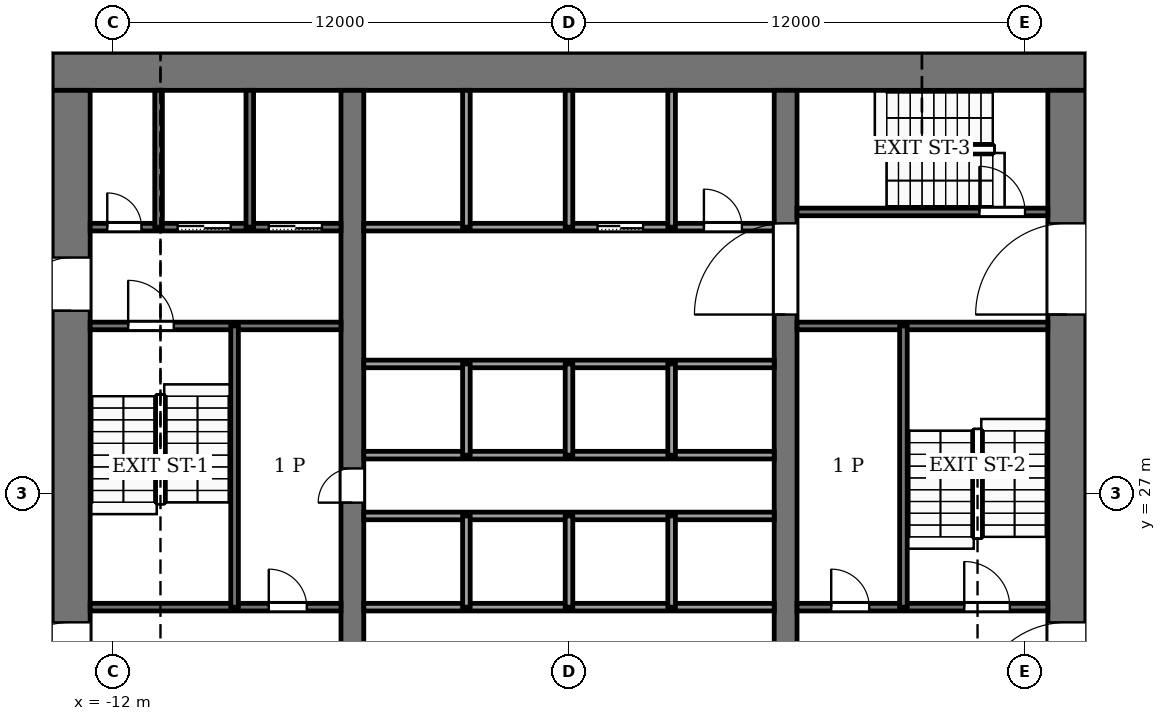
"""IFC4 building model, lengths in metres.
Left out: names, types, materials, properties, quantities, classifications, styles, units other than length and angle.
Written with IfcOpenShell. Run it as: python <this file> out.ifc"""

import sys

from ifc_helpers import new_model, si_unit, direction, frame, frame_2d, origin, place, context, subcontext, project, spatial, rectangle, extrude, element, fill, save


model = new_model("IFC4")
c1 = context("Model", 3, precision=1e-05, world=origin(), true_north=direction((0.0, 1.0)))
c2 = subcontext(c1, "Body", "Model", "MODEL_VIEW")
j1 = project(units=[si_unit("LENGTHUNIT", "METRE"), si_unit("PLANEANGLEUNIT", "RADIAN")], contexts=[c1])
p1 = place(None, origin())
s1 = spatial("IfcSite", under=j1, at=p1, CompositionType="ELEMENT")
p2 = place(p1, origin())
s2 = spatial("IfcBuilding", under=s1, at=p2, CompositionType="ELEMENT")
p3 = place(p2, frame((0.0, 0.0, 170.0)))
s3 = spatial("IfcBuildingStorey", under=s2, at=p3, CompositionType="ELEMENT", Elevation=170.0)
p4 = place(p3, frame((-13.6, 38.1, -0.25), z_axis=(0.0, 0.0, 1.0), x_axis=(1.0, 0.0, 0.0)))
e1 = element("IfcWall", 1, at=p4, inside=s3, PredefinedType="SHEAR", context=c2, shape_type="SweptSolid", body=[
    extrude(rectangle(XDim=27.2, YDim=1.0, at=frame_2d((13.6, 0.0))), origin(), (0.0, 0.0, 1.0), 7.12),
])
p5 = place(p3, frame((-13.1, 18.4, -0.25), z_axis=(0.0, 0.0, 1.0), x_axis=(0.0, 1.0, 0.0)))
e2 = element("IfcWall", 2, at=p5, inside=s3, PredefinedType="SHEAR", context=c2, shape_type="SweptSolid", body=[
    extrude(rectangle(XDim=19.2, YDim=1.0, at=frame_2d((9.6, 0.0))), origin(), (0.0, 0.0, 1.0), 7.12),
])
p6 = place(p5, frame((2.8, 0.0, 0.25)))
e3 = element("IfcOpeningElement", 3, at=p6, cuts=e2, PredefinedType="OPENING", context=c2, shape_type="SweptSolid", body=[
    extrude(rectangle(XDim=2.4, YDim=2.4, at=frame_2d((1.2, 1.2))), frame((0.0, 0.51, 0.0), z_axis=(0.0, -1.0, 0.0), x_axis=(1.0, 0.0, 0.0)), (0.0, 0.0, 1.0), 1.02),
])
p7 = place(p5, frame((13.4, 0.0, 0.25)))
e4 = element("IfcOpeningElement", 4, at=p7, cuts=e2, PredefinedType="OPENING", context=c2, shape_type="SweptSolid", body=[
    extrude(rectangle(XDim=1.4, YDim=2.2, at=frame_2d((0.7, 1.1))), frame((0.0, 0.51, 0.0), z_axis=(0.0, -1.0, 0.0), x_axis=(1.0, 0.0, 0.0)), (0.0, 0.0, 1.0), 1.02),
])
p8 = place(p3, frame((13.1, 18.4, -0.25), z_axis=(0.0, 0.0, 1.0), x_axis=(0.0, 1.0, 0.0)))
e5 = element("IfcWall", 5, at=p8, inside=s3, PredefinedType="SHEAR", context=c2, shape_type="SweptSolid", body=[
    extrude(rectangle(XDim=19.2, YDim=1.0, at=frame_2d((9.6, 0.0))), origin(), (0.0, 0.0, 1.0), 7.12),
])
p9 = place(p8, frame((2.8, 0.0, 0.25)))
e6 = element("IfcOpeningElement", 6, at=p9, cuts=e5, PredefinedType="OPENING", context=c2, shape_type="SweptSolid", body=[
    extrude(rectangle(XDim=2.4, YDim=2.4, at=frame_2d((1.2, 1.2))), frame((0.0, 0.51, 0.0), z_axis=(0.0, -1.0, 0.0), x_axis=(1.0, 0.0, 0.0)), (0.0, 0.0, 1.0), 1.02),
])
p10 = place(p8, frame((13.3, 0.0, 0.25)))
e7 = element("IfcOpeningElement", 7, at=p10, cuts=e5, PredefinedType="OPENING", context=c2, shape_type="SweptSolid", body=[
    extrude(rectangle(XDim=2.4, YDim=2.4, at=frame_2d((1.2, 1.2))), frame((0.0, 0.51, 0.0), z_axis=(0.0, -1.0, 0.0), x_axis=(1.0, 0.0, 0.0)), (0.0, 0.0, 1.0), 1.02),
])
p11 = place(p3, frame((-5.7, 18.4, -0.25), z_axis=(0.0, 0.0, 1.0), x_axis=(0.0, 1.0, 0.0)))
e8 = element("IfcWall", 8, at=p11, inside=s3, PredefinedType="SHEAR", context=c2, shape_type="SweptSolid", body=[
    extrude(rectangle(XDim=19.2, YDim=0.6, at=frame_2d((9.6, 0.0))), origin(), (0.0, 0.0, 1.0), 7.12),
])
p12 = place(p11, frame((8.35, 0.0, 0.25)))
e9 = element("IfcOpeningElement", 9, at=p12, cuts=e8, PredefinedType="OPENING", context=c2, shape_type="SweptSolid", body=[
    extrude(rectangle(XDim=0.9, YDim=2.1, at=frame_2d((0.45, 1.05))), frame((0.0, 0.31, 0.0), z_axis=(0.0, -1.0, 0.0), x_axis=(1.0, 0.0, 0.0)), (0.0, 0.0, 1.0), 0.62),
])
p13 = place(p3, frame((5.7, 18.4, -0.25), z_axis=(0.0, 0.0, 1.0), x_axis=(0.0, 1.0, 0.0)))
e10 = element("IfcWall", 10, at=p13, inside=s3, PredefinedType="SHEAR", context=c2, shape_type="SweptSolid", body=[
    extrude(rectangle(XDim=19.2, YDim=0.6, at=frame_2d((9.6, 0.0))), origin(), (0.0, 0.0, 1.0), 7.12),
])
p14 = place(p13, frame((13.3, 0.0, 0.25)))
e11 = element("IfcOpeningElement", 11, at=p14, cuts=e10, PredefinedType="OPENING", context=c2, shape_type="SweptSolid", body=[
    extrude(rectangle(XDim=2.4, YDim=2.4, at=frame_2d((1.2, 1.2))), frame((0.0, 0.31, 0.0), z_axis=(0.0, -1.0, 0.0), x_axis=(1.0, 0.0, 0.0)), (0.0, 0.0, 1.0), 0.62),
])
p15 = place(p3, frame((-12.6, 24.0, 0.0), z_axis=(0.0, 0.0, 1.0), x_axis=(1.0, 0.0, 0.0)))
e12 = element("IfcWall", 12, at=p15, inside=s3, PredefinedType="PARTITIONING", context=c2, shape_type="SweptSolid", body=[
    extrude(rectangle(XDim=6.6, YDim=0.2, at=frame_2d((3.3, 0.0))), origin(), (0.0, 0.0, 1.0), 6.87),
])
p16 = place(p15, frame((4.7, 0.0, 0.0)))
e13 = element("IfcOpeningElement", 13, at=p16, cuts=e12, PredefinedType="OPENING", context=c2, shape_type="SweptSolid", body=[
    extrude(rectangle(XDim=1.0, YDim=2.1, at=frame_2d((0.5, 1.05))), frame((0.0, 0.11, 0.0), z_axis=(0.0, -1.0, 0.0), x_axis=(1.0, 0.0, 0.0)), (0.0, 0.0, 1.0), 0.22),
])
p17 = place(p3, frame((-5.4, 24.0, 0.0), z_axis=(0.0, 0.0, 1.0), x_axis=(1.0, 0.0, 0.0)))
e14 = element("IfcWall", 14, at=p17, inside=s3, PredefinedType="PARTITIONING", context=c2, shape_type="SweptSolid", body=[
    extrude(rectangle(XDim=10.8, YDim=0.2, at=frame_2d((5.4, 0.0))), origin(), (0.0, 0.0, 1.0), 6.87),
])
p18 = place(p3, frame((6.0, 24.0, 0.0), z_axis=(0.0, 0.0, 1.0), x_axis=(1.0, 0.0, 0.0)))
e15 = element("IfcWall", 15, at=p18, inside=s3, PredefinedType="PARTITIONING", context=c2, shape_type="SweptSolid", body=[
    extrude(rectangle(XDim=6.6, YDim=0.2, at=frame_2d((3.3, 0.0))), origin(), (0.0, 0.0, 1.0), 6.87),
])
p19 = place(p18, frame((0.9, 0.0, 0.0)))
e16 = element("IfcOpeningElement", 16, at=p19, cuts=e15, PredefinedType="OPENING", context=c2, shape_type="SweptSolid", body=[
    extrude(rectangle(XDim=1.0, YDim=2.1, at=frame_2d((0.5, 1.05))), frame((0.0, 0.11, 0.0), z_axis=(0.0, -1.0, 0.0), x_axis=(1.0, 0.0, 0.0)), (0.0, 0.0, 1.0), 0.22),
])
p20 = place(p18, frame((4.4, 0.0, 0.0)))
e17 = element("IfcOpeningElement", 17, at=p20, cuts=e15, PredefinedType="OPENING", context=c2, shape_type="SweptSolid", body=[
    extrude(rectangle(XDim=1.2, YDim=2.2, at=frame_2d((0.6, 1.1))), frame((0.0, 0.11, 0.0), z_axis=(0.0, -1.0, 0.0), x_axis=(1.0, 0.0, 0.0)), (0.0, 0.0, 1.0), 0.22),
])
for number, where, z_axis, x_axis in (
    (18, (-5.4, 26.4, 0.0), (0.0, 0.0, 1.0), (1.0, 0.0, 0.0)),
    (19, (-5.4, 28.0, 0.0), (0.0, 0.0, 1.0), (1.0, 0.0, 0.0)),
    (20, (-5.4, 30.4, 0.0), (0.0, 0.0, 1.0), (1.0, 0.0, 0.0)),
):
    element("IfcWall", number, at=place(p3, frame(where, z_axis=z_axis, x_axis=x_axis)), inside=s3, PredefinedType="PARTITIONING", context=c2, shape_type="SweptSolid", body=[
        extrude(rectangle(XDim=10.8, YDim=0.2, at=frame_2d((5.4, 0.0))), origin(), (0.0, 0.0, 1.0), 6.87),
    ])
p21 = place(p3, frame((-12.6, 31.4, 0.0), z_axis=(0.0, 0.0, 1.0), x_axis=(1.0, 0.0, 0.0)))
e21 = element("IfcWall", 21, at=p21, inside=s3, PredefinedType="PARTITIONING", context=c2, shape_type="SweptSolid", body=[
    extrude(rectangle(XDim=6.6, YDim=0.2, at=frame_2d((3.3, 0.0))), origin(), (0.0, 0.0, 1.0), 6.87),
])
p22 = place(p21, frame((1.0, 0.0, 0.0)))
e22 = element("IfcOpeningElement", 22, at=p22, cuts=e21, PredefinedType="OPENING", context=c2, shape_type="SweptSolid", body=[
    extrude(rectangle(XDim=1.2, YDim=2.2, at=frame_2d((0.6, 1.1))), frame((0.0, 0.11, 0.0), z_axis=(0.0, -1.0, 0.0), x_axis=(1.0, 0.0, 0.0)), (0.0, 0.0, 1.0), 0.22),
])
p23 = place(p3, frame((6.0, 31.4, 0.0), z_axis=(0.0, 0.0, 1.0), x_axis=(1.0, 0.0, 0.0)))
e23 = element("IfcWall", 23, at=p23, inside=s3, PredefinedType="PARTITIONING", context=c2, shape_type="SweptSolid", body=[
    extrude(rectangle(XDim=6.6, YDim=0.2, at=frame_2d((3.3, 0.0))), origin(), (0.0, 0.0, 1.0), 6.87),
])
p24 = place(p3, frame((-12.6, 34.0, 0.0), z_axis=(0.0, 0.0, 1.0), x_axis=(1.0, 0.0, 0.0)))
e24 = element("IfcWall", 24, at=p24, inside=s3, PredefinedType="PARTITIONING", context=c2, shape_type="SweptSolid", body=[
    extrude(rectangle(XDim=6.6, YDim=0.2, at=frame_2d((3.3, 0.0))), origin(), (0.0, 0.0, 1.0), 6.87),
])
p25 = place(p24, frame((4.7, 0.0, 0.0)))
e25 = element("IfcOpeningElement", 25, at=p25, cuts=e24, PredefinedType="OPENING", context=c2, shape_type="SweptSolid", body=[
    extrude(rectangle(XDim=1.4, YDim=2.2, at=frame_2d((0.7, 1.1))), frame((0.0, 0.11, 0.0), z_axis=(0.0, -1.0, 0.0), x_axis=(1.0, 0.0, 0.0)), (0.0, 0.0, 1.0), 0.22),
])
p26 = place(p24, frame((2.3, 0.0, 0.0)))
e26 = element("IfcOpeningElement", 26, at=p26, cuts=e24, PredefinedType="OPENING", context=c2, shape_type="SweptSolid", body=[
    extrude(rectangle(XDim=1.4, YDim=2.2, at=frame_2d((0.7, 1.1))), frame((0.0, 0.11, 0.0), z_axis=(0.0, -1.0, 0.0), x_axis=(1.0, 0.0, 0.0)), (0.0, 0.0, 1.0), 0.22),
])
p27 = place(p24, frame((0.45, 0.0, 0.0)))
e27 = element("IfcOpeningElement", 27, at=p27, cuts=e24, PredefinedType="OPENING", context=c2, shape_type="SweptSolid", body=[
    extrude(rectangle(XDim=0.9, YDim=2.1, at=frame_2d((0.45, 1.05))), frame((0.0, 0.11, 0.0), z_axis=(0.0, -1.0, 0.0), x_axis=(1.0, 0.0, 0.0)), (0.0, 0.0, 1.0), 0.22),
])
p28 = place(p3, frame((-5.4, 34.0, 0.0), z_axis=(0.0, 0.0, 1.0), x_axis=(1.0, 0.0, 0.0)))
e28 = element("IfcWall", 28, at=p28, inside=s3, PredefinedType="PARTITIONING", context=c2, shape_type="SweptSolid", body=[
    extrude(rectangle(XDim=10.8, YDim=0.2, at=frame_2d((5.4, 0.0))), origin(), (0.0, 0.0, 1.0), 6.87),
])
p29 = place(p28, frame((6.15, 0.0, 0.0)))
e29 = element("IfcOpeningElement", 29, at=p29, cuts=e28, PredefinedType="OPENING", context=c2, shape_type="SweptSolid", body=[
    extrude(rectangle(XDim=1.2, YDim=2.2, at=frame_2d((0.6, 1.1))), frame((0.0, 0.11, 0.0), z_axis=(0.0, -1.0, 0.0), x_axis=(1.0, 0.0, 0.0)), (0.0, 0.0, 1.0), 0.22),
])
p30 = place(p28, frame((8.95, 0.0, 0.0)))
e30 = element("IfcOpeningElement", 30, at=p30, cuts=e28, PredefinedType="OPENING", context=c2, shape_type="SweptSolid", body=[
    extrude(rectangle(XDim=1.0, YDim=2.1, at=frame_2d((0.5, 1.05))), frame((0.0, 0.11, 0.0), z_axis=(0.0, -1.0, 0.0), x_axis=(1.0, 0.0, 0.0)), (0.0, 0.0, 1.0), 0.22),
])
p31 = place(p3, frame((6.0, 34.4, 0.0), z_axis=(0.0, 0.0, 1.0), x_axis=(1.0, 0.0, 0.0)))
e31 = element("IfcWall", 31, at=p31, inside=s3, PredefinedType="PARTITIONING", context=c2, shape_type="SweptSolid", body=[
    extrude(rectangle(XDim=6.6, YDim=0.2, at=frame_2d((3.3, 0.0))), origin(), (0.0, 0.0, 1.0), 6.87),
])
p32 = place(p31, frame((4.8, 0.0, 0.0)))
e32 = element("IfcOpeningElement", 32, at=p32, cuts=e31, PredefinedType="OPENING", context=c2, shape_type="SweptSolid", body=[
    extrude(rectangle(XDim=1.2, YDim=2.2, at=frame_2d((0.6, 1.1))), frame((0.0, 0.11, 0.0), z_axis=(0.0, -1.0, 0.0), x_axis=(1.0, 0.0, 0.0)), (0.0, 0.0, 1.0), 0.22),
])
p33 = place(p3, frame((-10.8, 34.0, 0.0), z_axis=(0.0, 0.0, 1.0), x_axis=(0.0, 1.0, 0.0)))
e33 = element("IfcWall", 33, at=p33, inside=s3, PredefinedType="PARTITIONING", context=c2, shape_type="SweptSolid", body=[
    extrude(rectangle(XDim=3.6, YDim=0.2, at=frame_2d((1.8, 0.0))), origin(), (0.0, 0.0, 1.0), 6.87),
])
p34 = place(p3, frame((-8.8, 24.0, 0.0), z_axis=(0.0, 0.0, 1.0), x_axis=(0.0, 1.0, 0.0)))
e34 = element("IfcWall", 34, at=p34, inside=s3, PredefinedType="PARTITIONING", context=c2, shape_type="SweptSolid", body=[
    extrude(rectangle(XDim=7.4, YDim=0.2, at=frame_2d((3.7, 0.0))), origin(), (0.0, 0.0, 1.0), 6.87),
])
p35 = place(p3, frame((-8.4, 34.0, 0.0), z_axis=(0.0, 0.0, 1.0), x_axis=(0.0, 1.0, 0.0)))
e35 = element("IfcWall", 35, at=p35, inside=s3, PredefinedType="PARTITIONING", context=c2, shape_type="SweptSolid", body=[
    extrude(rectangle(XDim=3.6, YDim=0.2, at=frame_2d((1.8, 0.0))), origin(), (0.0, 0.0, 1.0), 6.87),
])
for number, where, z_axis, x_axis in (
    (36, (-2.7, 24.0, 0.0), (0.0, 0.0, 1.0), (0.0, 1.0, 0.0)),
    (37, (-2.7, 28.0, 0.0), (0.0, 0.0, 1.0), (0.0, 1.0, 0.0)),
):
    element("IfcWall", number, at=place(p3, frame(where, z_axis=z_axis, x_axis=x_axis)), inside=s3, PredefinedType="PARTITIONING", context=c2, shape_type="SweptSolid", body=[
        extrude(rectangle(XDim=2.4, YDim=0.2, at=frame_2d((1.2, 0.0))), origin(), (0.0, 0.0, 1.0), 6.87),
    ])
p36 = place(p3, frame((-2.7, 34.0, 0.0), z_axis=(0.0, 0.0, 1.0), x_axis=(0.0, 1.0, 0.0)))
e38 = element("IfcWall", 38, at=p36, inside=s3, PredefinedType="PARTITIONING", context=c2, shape_type="SweptSolid", body=[
    extrude(rectangle(XDim=3.6, YDim=0.2, at=frame_2d((1.8, 0.0))), origin(), (0.0, 0.0, 1.0), 6.87),
])
for number, where, z_axis, x_axis in (
    (39, (0.0, 24.0, 0.0), (0.0, 0.0, 1.0), (0.0, 1.0, 0.0)),
    (40, (0.0, 28.0, 0.0), (0.0, 0.0, 1.0), (0.0, 1.0, 0.0)),
):
    element("IfcWall", number, at=place(p3, frame(where, z_axis=z_axis, x_axis=x_axis)), inside=s3, PredefinedType="PARTITIONING", context=c2, shape_type="SweptSolid", body=[
        extrude(rectangle(XDim=2.4, YDim=0.2, at=frame_2d((1.2, 0.0))), origin(), (0.0, 0.0, 1.0), 6.87),
    ])
p37 = place(p3, frame((0.0, 34.0, 0.0), z_axis=(0.0, 0.0, 1.0), x_axis=(0.0, 1.0, 0.0)))
e41 = element("IfcWall", 41, at=p37, inside=s3, PredefinedType="PARTITIONING", context=c2, shape_type="SweptSolid", body=[
    extrude(rectangle(XDim=3.6, YDim=0.2, at=frame_2d((1.8, 0.0))), origin(), (0.0, 0.0, 1.0), 6.87),
])
for number, where, z_axis, x_axis in (
    (42, (2.7, 24.0, 0.0), (0.0, 0.0, 1.0), (0.0, 1.0, 0.0)),
    (43, (2.7, 28.0, 0.0), (0.0, 0.0, 1.0), (0.0, 1.0, 0.0)),
):
    element("IfcWall", number, at=place(p3, frame(where, z_axis=z_axis, x_axis=x_axis)), inside=s3, PredefinedType="PARTITIONING", context=c2, shape_type="SweptSolid", body=[
        extrude(rectangle(XDim=2.4, YDim=0.2, at=frame_2d((1.2, 0.0))), origin(), (0.0, 0.0, 1.0), 6.87),
    ])
p38 = place(p3, frame((2.7, 34.0, 0.0), z_axis=(0.0, 0.0, 1.0), x_axis=(0.0, 1.0, 0.0)))
e44 = element("IfcWall", 44, at=p38, inside=s3, PredefinedType="PARTITIONING", context=c2, shape_type="SweptSolid", body=[
    extrude(rectangle(XDim=3.6, YDim=0.2, at=frame_2d((1.8, 0.0))), origin(), (0.0, 0.0, 1.0), 6.87),
])
p39 = place(p3, frame((8.8, 24.0, 0.0), z_axis=(0.0, 0.0, 1.0), x_axis=(0.0, 1.0, 0.0)))
e45 = element("IfcWall", 45, at=p39, inside=s3, PredefinedType="PARTITIONING", context=c2, shape_type="SweptSolid", body=[
    extrude(rectangle(XDim=7.4, YDim=0.2, at=frame_2d((3.7, 0.0))), origin(), (0.0, 0.0, 1.0), 6.87),
])
p40 = place(p29, origin())
e46 = element("IfcDoor", 46, at=p40, inside=s3, OperationType="SLIDING_TO_LEFT", PredefinedType="DOOR", context=c2, shape_type="SweptSolid", body=[
    extrude(rectangle(XDim=1.2, YDim=2.2, at=frame_2d((0.6, 1.1))), frame((0.0, 0.025, 0.0), z_axis=(0.0, -1.0, 0.0), x_axis=(1.0, 0.0, 0.0)), (0.0, 0.0, 1.0), 0.05),
])
fill(e29, e46)
p41 = place(p25, origin())
e47 = element("IfcDoor", 47, at=p41, inside=s3, OperationType="SLIDING_TO_LEFT", PredefinedType="DOOR", context=c2, shape_type="SweptSolid", body=[
    extrude(rectangle(XDim=1.4, YDim=2.2, at=frame_2d((0.7, 1.1))), frame((0.0, 0.025, 0.0), z_axis=(0.0, -1.0, 0.0), x_axis=(1.0, 0.0, 0.0)), (0.0, 0.0, 1.0), 0.05),
])
fill(e25, e47)
p42 = place(p26, origin())
e48 = element("IfcDoor", 48, at=p42, inside=s3, OperationType="SLIDING_TO_LEFT", PredefinedType="DOOR", context=c2, shape_type="SweptSolid", body=[
    extrude(rectangle(XDim=1.4, YDim=2.2, at=frame_2d((0.7, 1.1))), frame((0.0, 0.025, 0.0), z_axis=(0.0, -1.0, 0.0), x_axis=(1.0, 0.0, 0.0)), (0.0, 0.0, 1.0), 0.05),
])
fill(e26, e48)
p43 = place(p27, origin())
e49 = element("IfcDoor", 49, at=p43, inside=s3, OperationType="SINGLE_SWING_RIGHT", PredefinedType="DOOR", context=c2, shape_type="SweptSolid", body=[
    extrude(rectangle(XDim=0.9, YDim=2.1, at=frame_2d((0.45, 1.05))), frame((0.0, 0.025, 0.0), z_axis=(0.0, -1.0, 0.0), x_axis=(1.0, 0.0, 0.0)), (0.0, 0.0, 1.0), 0.05),
])
fill(e27, e49)
p44 = place(p16, origin())
e50 = element("IfcDoor", 50, at=p44, inside=s3, OperationType="SINGLE_SWING_RIGHT", PredefinedType="DOOR", context=c2, shape_type="SweptSolid", body=[
    extrude(rectangle(XDim=1.0, YDim=2.1, at=frame_2d((0.5, 1.05))), frame((0.0, 0.025, 0.0), z_axis=(0.0, -1.0, 0.0), x_axis=(1.0, 0.0, 0.0)), (0.0, 0.0, 1.0), 0.05),
])
fill(e13, e50)
p45 = place(p19, origin())
e51 = element("IfcDoor", 51, at=p45, inside=s3, OperationType="SINGLE_SWING_LEFT", PredefinedType="DOOR", context=c2, shape_type="SweptSolid", body=[
    extrude(rectangle(XDim=1.0, YDim=2.1, at=frame_2d((0.5, 1.05))), frame((0.0, 0.025, 0.0), z_axis=(0.0, -1.0, 0.0), x_axis=(1.0, 0.0, 0.0)), (0.0, 0.0, 1.0), 0.05),
])
fill(e16, e51)
p46 = place(p30, origin())
e52 = element("IfcDoor", 52, at=p46, inside=s3, OperationType="SINGLE_SWING_LEFT", PredefinedType="DOOR", context=c2, shape_type="SweptSolid", body=[
    extrude(rectangle(XDim=1.0, YDim=2.1, at=frame_2d((0.5, 1.05))), frame((0.0, 0.025, 0.0), z_axis=(0.0, -1.0, 0.0), x_axis=(1.0, 0.0, 0.0)), (0.0, 0.0, 1.0), 0.05),
])
fill(e30, e52)
p47 = place(p12, origin())
e53 = element("IfcDoor", 53, at=p47, inside=s3, OperationType="SINGLE_SWING_RIGHT", PredefinedType="DOOR", context=c2, shape_type="SweptSolid", body=[
    extrude(rectangle(XDim=0.9, YDim=2.1, at=frame_2d((0.45, 1.05))), frame((0.0, 0.025, 0.0), z_axis=(0.0, -1.0, 0.0), x_axis=(1.0, 0.0, 0.0)), (0.0, 0.0, 1.0), 0.05),
])
fill(e9, e53)
p48 = place(p22, origin())
e54 = element("IfcDoor", 54, at=p48, inside=s3, OperationType="SINGLE_SWING_RIGHT", PredefinedType="DOOR", context=c2, shape_type="SweptSolid", body=[
    extrude(rectangle(XDim=1.2, YDim=2.2, at=frame_2d((0.6, 1.1))), frame((0.0, 0.025, 0.0), z_axis=(0.0, -1.0, 0.0), x_axis=(1.0, 0.0, 0.0)), (0.0, 0.0, 1.0), 0.05),
])
fill(e22, e54)
p49 = place(p20, origin())
e55 = element("IfcDoor", 55, at=p49, inside=s3, OperationType="SINGLE_SWING_LEFT", PredefinedType="DOOR", context=c2, shape_type="SweptSolid", body=[
    extrude(rectangle(XDim=1.2, YDim=2.2, at=frame_2d((0.6, 1.1))), frame((0.0, 0.025, 0.0), z_axis=(0.0, -1.0, 0.0), x_axis=(1.0, 0.0, 0.0)), (0.0, 0.0, 1.0), 0.05),
])
fill(e17, e55)
p50 = place(p32, origin())
e56 = element("IfcDoor", 56, at=p50, inside=s3, OperationType="SINGLE_SWING_RIGHT", PredefinedType="DOOR", context=c2, shape_type="SweptSolid", body=[
    extrude(rectangle(XDim=1.2, YDim=2.2, at=frame_2d((0.6, 1.1))), frame((0.0, 0.025, 0.0), z_axis=(0.0, -1.0, 0.0), x_axis=(1.0, 0.0, 0.0)), (0.0, 0.0, 1.0), 0.05),
])
fill(e32, e56)
p51 = place(p14, origin())
e57 = element("IfcDoor", 57, at=p51, inside=s3, OperationType="DOUBLE_DOOR_SINGLE_SWING", PredefinedType="DOOR", context=c2, shape_type="SweptSolid", body=[
    extrude(rectangle(XDim=2.4, YDim=2.4, at=frame_2d((1.2, 1.2))), frame((0.0, 0.025, 0.0), z_axis=(0.0, -1.0, 0.0), x_axis=(1.0, 0.0, 0.0)), (0.0, 0.0, 1.0), 0.05),
])
fill(e11, e57)
p52 = place(p6, origin())
e58 = element("IfcDoor", 58, at=p52, inside=s3, OperationType="DOUBLE_DOOR_SINGLE_SWING", PredefinedType="DOOR", context=c2, shape_type="SweptSolid", body=[
    extrude(rectangle(XDim=2.4, YDim=2.4, at=frame_2d((1.2, 1.2))), frame((0.0, 0.025, 0.0), z_axis=(0.0, -1.0, 0.0), x_axis=(1.0, 0.0, 0.0)), (0.0, 0.0, 1.0), 0.05),
])
fill(e3, e58)
p53 = place(p9, origin())
e59 = element("IfcDoor", 59, at=p53, inside=s3, OperationType="DOUBLE_DOOR_SINGLE_SWING", PredefinedType="DOOR", context=c2, shape_type="SweptSolid", body=[
    extrude(rectangle(XDim=2.4, YDim=2.4, at=frame_2d((1.2, 1.2))), frame((0.0, 0.025, 0.0), z_axis=(0.0, -1.0, 0.0), x_axis=(1.0, 0.0, 0.0)), (0.0, 0.0, 1.0), 0.05),
])
fill(e6, e59)
p54 = place(p10, origin())
e60 = element("IfcDoor", 60, at=p54, inside=s3, OperationType="DOUBLE_DOOR_SINGLE_SWING", PredefinedType="DOOR", context=c2, shape_type="SweptSolid", body=[
    extrude(rectangle(XDim=2.4, YDim=2.4, at=frame_2d((1.2, 1.2))), frame((0.0, 0.025, 0.0), z_axis=(0.0, -1.0, 0.0), x_axis=(1.0, 0.0, 0.0)), (0.0, 0.0, 1.0), 0.05),
])
fill(e7, e60)
p55 = place(p7, origin())
e61 = element("IfcDoor", 61, at=p55, inside=s3, OperationType="SINGLE_SWING_RIGHT", PredefinedType="DOOR", context=c2, shape_type="SweptSolid", body=[
    extrude(rectangle(XDim=1.4, YDim=2.2, at=frame_2d((0.7, 1.1))), frame((0.0, 0.025, 0.0), z_axis=(0.0, -1.0, 0.0), x_axis=(1.0, 0.0, 0.0)), (0.0, 0.0, 1.0), 0.05),
])
fill(e4, e61)
save(model, sys.argv[1])
